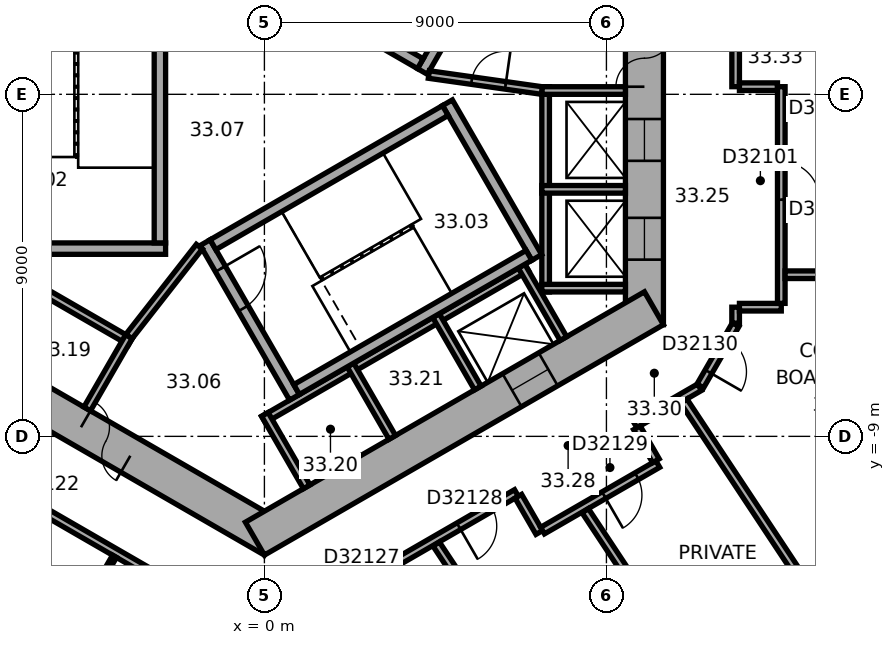
"""IFC4 building model, lengths in metres.
Left out: names, types, materials, properties, quantities, classifications, styles, units other than length and angle.
Written with IfcOpenShell. Run it as: python <this file> out.ifc"""

import sys

from ifc_helpers import new_model, si_unit, direction, frame, frame_2d, origin, place, context, subcontext, project, spatial, rectangle, extrude, element, fill, save


model = new_model("IFC4")
c1 = context("Model", 3, precision=1e-05, world=origin(), true_north=direction((0.0, 1.0)))
c2 = subcontext(c1, "Body", "Model", "MODEL_VIEW")
j1 = project(units=[si_unit("LENGTHUNIT", "METRE"), si_unit("PLANEANGLEUNIT", "RADIAN")], contexts=[c1])
p1 = place(None, origin())
s1 = spatial("IfcSite", under=j1, at=p1, CompositionType="ELEMENT")
p2 = place(p1, origin())
s2 = spatial("IfcBuilding", under=s1, at=p2, CompositionType="ELEMENT")
p3 = place(p2, frame((0.0, 0.0, 135.5)))
s3 = spatial("IfcBuildingStorey", under=s2, at=p3, CompositionType="ELEMENT", Elevation=135.5)
p4 = place(p3, frame((10.0, -6.062, 0.0), z_axis=(0.0, 0.0, 1.0), x_axis=(0.0, 1.0, 0.0)))
e1 = element("IfcWall", 1, at=p4, inside=s3, PredefinedType="SHEAR", context=c2, shape_type="SweptSolid", body=[
    extrude(rectangle(XDim=12.125, YDim=1.0, at=frame_2d((6.062, 0.0))), origin(), (0.0, 0.0, 1.0), 3.7),
])
p5 = place(p4, frame((6.262, 0.0, 0.0)))
e2 = element("IfcOpeningElement", 2, at=p5, cuts=e1, PredefinedType="OPENING", context=c2, shape_type="SweptSolid", body=[
    extrude(rectangle(XDim=1.5, YDim=2.1, at=frame_2d((0.75, 1.05))), frame((0.0, 0.51, 0.0), z_axis=(0.0, -1.0, 0.0), x_axis=(1.0, 0.0, 0.0)), (0.0, 0.0, 1.0), 1.02),
])
p6 = place(p4, frame((1.712, 0.0, 0.0)))
e3 = element("IfcOpeningElement", 3, at=p6, cuts=e1, PredefinedType="OPENING", context=c2, shape_type="SweptSolid", body=[
    extrude(rectangle(XDim=1.1, YDim=2.1, at=frame_2d((0.55, 1.05))), frame((0.0, 0.51, 0.0), z_axis=(0.0, -1.0, 0.0), x_axis=(1.0, 0.0, 0.0)), (0.0, 0.0, 1.0), 1.02),
])
p7 = place(p4, frame((4.312, 0.0, 0.0)))
e4 = element("IfcOpeningElement", 4, at=p7, cuts=e1, PredefinedType="OPENING", context=c2, shape_type="SweptSolid", body=[
    extrude(rectangle(XDim=1.1, YDim=2.1, at=frame_2d((0.55, 1.05))), frame((0.0, 0.51, 0.0), z_axis=(0.0, -1.0, 0.0), x_axis=(1.0, 0.0, 0.0)), (0.0, 0.0, 1.0), 1.02),
])
p8 = place(p3, frame((-10.25, -5.629, 0.0), z_axis=(0.0, 0.0, 1.0), x_axis=(0.866022616891, -0.50000482701, 0.0)))
e5 = element("IfcWall", 5, at=p8, inside=s3, PredefinedType="SHEAR", context=c2, shape_type="SweptSolid", body=[
    extrude(rectangle(XDim=12.125, YDim=1.0, at=frame_2d((6.062, 0.0))), origin(), (0.0, 0.0, 1.0), 3.7),
])
p9 = place(p8, frame((6.262, 0.0, 0.0)))
e6 = element("IfcOpeningElement", 6, at=p9, cuts=e5, PredefinedType="OPENING", context=c2, shape_type="SweptSolid", body=[
    extrude(rectangle(XDim=1.5, YDim=2.1, at=frame_2d((0.75, 1.05))), frame((0.0, 0.51, 0.0), z_axis=(0.0, -1.0, 0.0), x_axis=(1.0, 0.0, 0.0)), (0.0, 0.0, 1.0), 1.02),
])
p10 = place(p3, frame((-0.25, -11.691, 0.0), z_axis=(0.0, 0.0, 1.0), x_axis=(0.866022616891, 0.50000482701, 0.0)))
e7 = element("IfcWall", 7, at=p10, inside=s3, PredefinedType="SHEAR", context=c2, shape_type="SweptSolid", body=[
    extrude(rectangle(XDim=12.125, YDim=1.0, at=frame_2d((6.062, 0.0))), origin(), (0.0, 0.0, 1.0), 3.7),
])
p11 = place(p10, frame((7.812, 0.0, 0.0)))
e8 = element("IfcOpeningElement", 8, at=p11, cuts=e7, PredefinedType="OPENING", context=c2, shape_type="SweptSolid", body=[
    extrude(rectangle(XDim=1.1, YDim=2.1, at=frame_2d((0.55, 1.05))), frame((0.0, 0.51, 0.0), z_axis=(0.0, -1.0, 0.0), x_axis=(1.0, 0.0, 0.0)), (0.0, 0.0, 1.0), 1.02),
])
p12 = place(p3, frame((7.4, -5.2, 0.0), z_axis=(0.0, 0.0, 1.0), x_axis=(0.0, 1.0, 0.0)))
e9 = element("IfcWall", 9, at=p12, inside=s3, PredefinedType="PARTITIONING", context=c2, shape_type="SweptSolid", body=[
    extrude(rectangle(XDim=5.4, YDim=0.2, at=frame_2d((2.7, 0.0))), origin(), (0.0, 0.0, 1.0), 3.35),
])
for number, where, z_axis, x_axis in (
    (10, (7.3, -5.1, 0.0), (0.0, 0.0, 1.0), (1.0, 0.0, 0.0)),
    (11, (7.3, -2.5, 0.0), (0.0, 0.0, 1.0), (1.0, 0.0, 0.0)),
    (12, (7.3, 0.1, 0.0), (0.0, 0.0, 1.0), (1.0, 0.0, 0.0)),
):
    element("IfcWall", number, at=place(p3, frame(where, z_axis=z_axis, x_axis=x_axis)), inside=s3, PredefinedType="PARTITIONING", context=c2, shape_type="SweptSolid", body=[
        extrude(rectangle(XDim=2.2, YDim=0.2, at=frame_2d((1.1, 0.0))), origin(), (0.0, 0.0, 1.0), 3.35),
    ])
p13 = place(p3, frame((-8.203, -3.809, 0.0), z_axis=(0.0, 0.0, 1.0), x_axis=(0.866028230842, -0.499995103361, 0.0)))
e13 = element("IfcWall", 13, at=p13, inside=s3, PredefinedType="PARTITIONING", context=c2, shape_type="SweptSolid", body=[
    extrude(rectangle(XDim=5.4, YDim=0.2, at=frame_2d((2.7, 0.0))), origin(), (0.0, 0.0, 1.0), 3.35),
])
p14 = place(p3, frame((-3.563, -6.372, 0.0), z_axis=(0.0, 0.0, 1.0), x_axis=(-0.499994660107, -0.866028486751, 0.0)))
e14 = element("IfcWall", 14, at=p14, inside=s3, PredefinedType="PARTITIONING", context=c2, shape_type="SweptSolid", body=[
    extrude(rectangle(XDim=2.2, YDim=0.2, at=frame_2d((1.1, 0.0))), origin(), (0.0, 0.0, 1.0), 3.35),
])
p15 = place(p3, frame((-0.024, -8.559, 0.0), z_axis=(0.0, 0.0, 1.0), x_axis=(0.866026010844, 0.49999894854, 0.0)))
e15 = element("IfcWall", 15, at=p15, inside=s3, PredefinedType="PARTITIONING", context=c2, shape_type="SweptSolid", body=[
    extrude(rectangle(XDim=8.0, YDim=0.2, at=frame_2d((4.0, 0.0))), origin(), (0.0, 0.0, 1.0), 3.35),
])
for number, where, z_axis, x_axis in (
    (16, (0.013, -8.422, 0.0), (0.0, 0.0, 1.0), (0.5, -0.866, 0.0)),
    (17, (2.264, -7.122, 0.0), (0.0, 0.0, 1.0), (0.5, -0.866, 0.0)),
    (18, (4.516, -5.822, 0.0), (0.0, 0.0, 1.0), (0.5, -0.866, 0.0)),
    (19, (6.768, -4.522, 0.0), (0.0, 0.0, 1.0), (0.5, -0.866, 0.0)),
):
    element("IfcWall", number, at=place(p3, frame(where, z_axis=z_axis, x_axis=x_axis)), inside=s3, PredefinedType="PARTITIONING", context=c2, shape_type="SweptSolid", body=[
        extrude(rectangle(XDim=2.2, YDim=0.2, at=frame_2d((1.1, 0.0))), origin(), (0.0, 0.0, 1.0), 3.35),
    ])
p16 = place(p3, frame((4.158, 0.602, 0.0), z_axis=(0.0, 0.0, 1.0), x_axis=(0.499977259774, 0.866038532462, 0.0)))
e20 = element("IfcWall", 20, at=p16, inside=s3, PredefinedType="SHEAR", context=c2, shape_type="SweptSolid", body=[
    extrude(rectangle(XDim=4.7, YDim=0.3, at=frame_2d((2.35, 0.0))), origin(), (0.0, 0.0, 1.0), 3.35),
])
p17 = place(p16, frame((0.8, 0.0, 0.0)))
e21 = element("IfcOpeningElement", 21, at=p17, cuts=e20, PredefinedType="OPENING", context=c2, shape_type="SweptSolid", body=[
    extrude(rectangle(XDim=1.2, YDim=2.1, at=frame_2d((0.6, 1.05))), frame((0.0, 0.16, 0.0), z_axis=(0.0, -1.0, 0.0), x_axis=(1.0, 0.0, 0.0)), (0.0, 0.0, 1.0), 0.32),
])
p18 = place(p3, frame((4.103, 0.807, 0.0), z_axis=(0.0, 0.0, 1.0), x_axis=(-0.866027801685, 0.499995846692, 0.0)))
e22 = element("IfcWall", 22, at=p18, inside=s3, PredefinedType="SHEAR", context=c2, shape_type="SweptSolid", body=[
    extrude(rectangle(XDim=7.06, YDim=0.3, at=frame_2d((3.53, 0.0))), origin(), (0.0, 0.0, 1.0), 3.35),
])
p19 = place(p3, frame((-2.6, -4.06, 0.0), z_axis=(0.0, 0.0, 1.0), x_axis=(-1.0, 0.0, 0.0)))
e23 = element("IfcWall", 23, at=p19, inside=s3, PredefinedType="SHEAR", context=c2, shape_type="SweptSolid", body=[
    extrude(rectangle(XDim=4.7, YDim=0.3, at=frame_2d((2.35, 0.0))), origin(), (0.0, 0.0, 1.0), 3.35),
])
p20 = place(p3, frame((-2.75, 3.15, 0.0), z_axis=(0.0, 0.0, 1.0), x_axis=(0.0, -1.0, 0.0)))
e24 = element("IfcWall", 24, at=p20, inside=s3, PredefinedType="SHEAR", context=c2, shape_type="SweptSolid", body=[
    extrude(rectangle(XDim=7.06, YDim=0.3, at=frame_2d((3.53, 0.0))), origin(), (0.0, 0.0, 1.0), 3.35),
])
p21 = place(p3, frame((-1.558, -3.902, 0.0), z_axis=(0.0, 0.0, 1.0), x_axis=(0.499977259774, -0.866038532462, 0.0)))
e25 = element("IfcWall", 25, at=p21, inside=s3, PredefinedType="SHEAR", context=c2, shape_type="SweptSolid", body=[
    extrude(rectangle(XDim=4.7, YDim=0.3, at=frame_2d((2.35, 0.0))), origin(), (0.0, 0.0, 1.0), 3.35),
])
p22 = place(p21, frame((0.8, 0.0, 0.0)))
e26 = element("IfcOpeningElement", 26, at=p22, cuts=e25, PredefinedType="OPENING", context=c2, shape_type="SweptSolid", body=[
    extrude(rectangle(XDim=1.2, YDim=2.1, at=frame_2d((0.6, 1.05))), frame((0.0, 0.16, 0.0), z_axis=(0.0, -1.0, 0.0), x_axis=(1.0, 0.0, 0.0)), (0.0, 0.0, 1.0), 0.32),
])
p23 = place(p3, frame((4.816, -0.222, 0.0), z_axis=(0.0, 0.0, 1.0), x_axis=(0.499977259774, -0.866038532462, 0.0)))
e27 = element("IfcWall", 27, at=p23, inside=s3, PredefinedType="SHEAR", context=c2, shape_type="SweptSolid", body=[
    extrude(rectangle(XDim=4.7, YDim=0.3, at=frame_2d((2.35, 0.0))), origin(), (0.0, 0.0, 1.0), 3.35),
])
for number, where, z_axis, x_axis in (
    (28, (-1.353, -3.957, 0.0), (0.0, 0.0, 1.0), (0.866, 0.5, 0.0)),
    (29, (0.847, -7.767, 0.0), (0.0, 0.0, 1.0), (0.866, 0.5, 0.0)),
):
    element("IfcWall", number, at=place(p3, frame(where, z_axis=z_axis, x_axis=x_axis)), inside=s3, PredefinedType="SHEAR", context=c2, shape_type="SweptSolid", body=[
        extrude(rectangle(XDim=7.06, YDim=0.3, at=frame_2d((3.53, 0.0))), origin(), (0.0, 0.0, 1.0), 3.35),
    ])
p24 = place(p3, frame((4.327, 0.521, 0.0), z_axis=(0.0, 0.0, 1.0), x_axis=(0.990124376366, -0.14019172346, 0.0)))
e30 = element("IfcWall", 30, at=p24, inside=s3, PredefinedType="PARTITIONING", context=c2, shape_type="SweptSolid", body=[
    extrude(rectangle(XDim=3.002, YDim=0.2, at=frame_2d((1.501, 0.0))), origin(), (0.0, 0.0, 1.0), 3.35),
])
p25 = place(p24, frame((1.138, 0.0, 0.0)))
e31 = element("IfcOpeningElement", 31, at=p25, cuts=e30, PredefinedType="OPENING", context=c2, shape_type="SweptSolid", body=[
    extrude(rectangle(XDim=0.9, YDim=2.1, at=frame_2d((0.45, 1.05))), frame((0.0, 0.11, 0.0), z_axis=(0.0, -1.0, 0.0), x_axis=(1.0, 0.0, 0.0)), (0.0, 0.0, 1.0), 0.22),
])
p26 = place(p3, frame((-1.712, -4.008, 0.0), z_axis=(0.0, 0.0, 1.0), x_axis=(-0.616549420702, -0.787316208287, 0.0)))
e32 = element("IfcWall", 32, at=p26, inside=s3, PredefinedType="PARTITIONING", context=c2, shape_type="SweptSolid", body=[
    extrude(rectangle(XDim=3.002, YDim=0.2, at=frame_2d((1.501, 0.0))), origin(), (0.0, 0.0, 1.0), 3.35),
])
p27 = place(p3, frame((-11.415, -7.728, 0.0), z_axis=(0.0, 0.0, 1.0), x_axis=(0.866022749921, -0.500004596598, 0.0)))
e33 = element("IfcWall", 33, at=p27, inside=s3, PredefinedType="PARTITIONING", context=c2, shape_type="SweptSolid", body=[
    extrude(rectangle(XDim=12.084, YDim=0.2, at=frame_2d((6.042, 0.0))), origin(), (0.0, 0.0, 1.0), 3.35),
])
p28 = place(p27, frame((5.58, 0.0, 0.0)))
e34 = element("IfcOpeningElement", 34, at=p28, cuts=e33, PredefinedType="OPENING", context=c2, shape_type="SweptSolid", body=[
    extrude(rectangle(XDim=1.0, YDim=2.1, at=frame_2d((0.5, 1.05))), frame((0.0, 0.11, 0.0), z_axis=(0.0, -1.0, 0.0), x_axis=(1.0, 0.0, 0.0)), (0.0, 0.0, 1.0), 0.22),
])
p29 = place(p3, frame((-5.695, -15.188, 0.0), z_axis=(0.0, 0.0, 1.0), x_axis=(0.500010275428, 0.866019471182, 0.0)))
e35 = element("IfcWall", 35, at=p29, inside=s3, PredefinedType="PARTITIONING", context=c2, shape_type="SweptSolid", body=[
    extrude(rectangle(XDim=3.5, YDim=0.12, at=frame_2d((1.75, 0.0))), origin(), (0.0, 0.0, 1.0), 3.35),
])
p30 = place(p29, frame((1.3, 0.0, 0.0)))
e36 = element("IfcOpeningElement", 36, at=p30, cuts=e35, PredefinedType="OPENING", context=c2, shape_type="SweptSolid", body=[
    extrude(rectangle(XDim=0.9, YDim=2.1, at=frame_2d((0.45, 1.05))), frame((0.0, 0.07, 0.0), z_axis=(0.0, -1.0, 0.0), x_axis=(1.0, 0.0, 0.0)), (0.0, 0.0, 1.0), 0.14),
])
p31 = place(p3, frame((1.204, -13.623, 0.0), z_axis=(0.0, 0.0, 1.0), x_axis=(0.866031867142, 0.49998880497, 0.0)))
e37 = element("IfcWall", 37, at=p31, inside=s3, PredefinedType="PARTITIONING", context=c2, shape_type="SweptSolid", body=[
    extrude(rectangle(XDim=6.268, YDim=0.2, at=frame_2d((3.134, 0.0))), origin(), (0.0, 0.0, 1.0), 3.35),
])
p32 = place(p31, frame((1.381, 0.0, 0.0)))
e38 = element("IfcOpeningElement", 38, at=p32, cuts=e37, PredefinedType="OPENING", context=c2, shape_type="SweptSolid", body=[
    extrude(rectangle(XDim=1.0, YDim=2.1, at=frame_2d((0.5, 1.05))), frame((0.0, 0.11, 0.0), z_axis=(0.0, -1.0, 0.0), x_axis=(1.0, 0.0, 0.0)), (0.0, 0.0, 1.0), 0.22),
])
p33 = place(p31, frame((4.515, 0.0, 0.0)))
e39 = element("IfcOpeningElement", 39, at=p33, cuts=e37, PredefinedType="OPENING", context=c2, shape_type="SweptSolid", body=[
    extrude(rectangle(XDim=1.0, YDim=2.1, at=frame_2d((0.5, 1.05))), frame((0.0, 0.11, 0.0), z_axis=(0.0, -1.0, 0.0), x_axis=(1.0, 0.0, 0.0)), (0.0, 0.0, 1.0), 0.22),
])
p34 = place(p3, frame((6.682, -10.576, 0.0), z_axis=(0.0, 0.0, 1.0), x_axis=(0.499978356969, -0.866037899034, 0.0)))
e40 = element("IfcWall", 40, at=p34, inside=s3, PredefinedType="PARTITIONING", context=c2, shape_type="SweptSolid", body=[
    extrude(rectangle(XDim=1.101, YDim=0.2, at=frame_2d((0.551, 0.0))), origin(), (0.0, 0.0, 1.0), 3.35),
])
p35 = place(p3, frame((7.319, -11.479, 0.0), z_axis=(0.0, 0.0, 1.0), x_axis=(0.866038154057, 0.49997791523, 0.0)))
e41 = element("IfcWall", 41, at=p35, inside=s3, PredefinedType="PARTITIONING", context=c2, shape_type="SweptSolid", body=[
    extrude(rectangle(XDim=3.502, YDim=0.2, at=frame_2d((1.751, 0.0))), origin(), (0.0, 0.0, 1.0), 3.35),
])
p36 = place(p35, frame((1.865, 0.0, 0.0)))
e42 = element("IfcOpeningElement", 42, at=p36, cuts=e41, PredefinedType="OPENING", context=c2, shape_type="SweptSolid", body=[
    extrude(rectangle(XDim=1.0, YDim=2.1, at=frame_2d((0.5, 1.05))), frame((0.0, 0.11, 0.0), z_axis=(0.0, -1.0, 0.0), x_axis=(1.0, 0.0, 0.0)), (0.0, 0.0, 1.0), 0.22),
])
p37 = place(p3, frame((9.15, -18.827, 0.0), z_axis=(0.0, 0.0, 1.0), x_axis=(-0.551942527453, 0.833882153777, 0.0)))
e43 = element("IfcWall", 43, at=p37, inside=s3, PredefinedType="PARTITIONING", context=c2, shape_type="SweptSolid", body=[
    extrude(rectangle(XDim=8.386, YDim=0.2, at=frame_2d((4.193, 0.0))), origin(), (0.0, 0.0, 1.0), 2.55),
])
p38 = place(p3, frame((9.752, -8.688, 0.0), z_axis=(0.0, 0.0, 1.0), x_axis=(0.865974105138, 0.500088841337, 0.0)))
e44 = element("IfcWall", 44, at=p38, inside=s3, PredefinedType="PARTITIONING", context=c2, shape_type="SweptSolid", body=[
    extrude(rectangle(XDim=1.961, YDim=0.2, at=frame_2d((0.98, 0.0))), origin(), (0.0, 0.0, 1.0), 3.35),
])
p39 = place(p3, frame((10.302, -9.642, 0.0), z_axis=(0.0, 0.0, 1.0), x_axis=(-0.500074377092, 0.865982457891, 0.0)))
e45 = element("IfcWall", 45, at=p39, inside=s3, PredefinedType="PARTITIONING", context=c2, shape_type="SweptSolid", body=[
    extrude(rectangle(XDim=1.001, YDim=0.2, at=frame_2d((0.5, 0.0))), origin(), (0.0, 0.0, 1.0), 3.35),
])
p40 = place(p3, frame((11.47, -7.673, 0.0), z_axis=(0.0, 0.0, 1.0), x_axis=(0.499964847546, 0.866045698112, 0.0)))
e46 = element("IfcWall", 46, at=p40, inside=s3, PredefinedType="PARTITIONING", context=c2, shape_type="SweptSolid", body=[
    extrude(rectangle(XDim=1.86, YDim=0.2, at=frame_2d((0.93, 0.0))), origin(), (0.0, 0.0, 1.0), 3.35),
])
p41 = place(p40, frame((0.43, 0.0, 0.0)))
e47 = element("IfcOpeningElement", 47, at=p41, cuts=e46, PredefinedType="OPENING", context=c2, shape_type="SweptSolid", body=[
    extrude(rectangle(XDim=1.0, YDim=2.1, at=frame_2d((0.5, 1.05))), frame((0.0, 0.11, 0.0), z_axis=(0.0, -1.0, 0.0), x_axis=(1.0, 0.0, 0.0)), (0.0, 0.0, 1.0), 0.22),
])
p42 = place(p3, frame((12.281, -16.755, 0.0), z_axis=(0.0, 0.0, 1.0), x_axis=(-0.551925794663, 0.833893228888, 0.0)))
e48 = element("IfcWall", 48, at=p42, inside=s3, PredefinedType="PARTITIONING", context=c2, shape_type="SweptSolid", body=[
    extrude(rectangle(XDim=6.953, YDim=0.2, at=frame_2d((3.476, 0.0))), origin(), (0.0, 0.0, 1.0), 3.35),
])
p43 = place(p3, frame((12.4, -6.022, 0.0), z_axis=(0.0, 0.0, 1.0), x_axis=(0.0, 1.0, 0.0)))
e49 = element("IfcWall", 49, at=p43, inside=s3, PredefinedType="PARTITIONING", context=c2, shape_type="SweptSolid", body=[
    extrude(rectangle(XDim=0.421, YDim=0.2, at=frame_2d((0.21, 0.0))), origin(), (0.0, 0.0, 1.0), 3.35),
])
p44 = place(p3, frame((12.4, 0.201, 0.0), z_axis=(0.0, 0.0, 1.0), x_axis=(0.0, 1.0, 0.0)))
e50 = element("IfcWall", 50, at=p44, inside=s3, PredefinedType="PARTITIONING", context=c2, shape_type="SweptSolid", body=[
    extrude(rectangle(XDim=5.861, YDim=0.2, at=frame_2d((2.931, 0.0))), origin(), (0.0, 0.0, 1.0), 3.35),
])
p45 = place(p44, frame((3.711, 0.0, 0.0)))
e51 = element("IfcOpeningElement", 51, at=p45, cuts=e50, PredefinedType="OPENING", context=c2, shape_type="SweptSolid", body=[
    extrude(rectangle(XDim=1.0, YDim=2.1, at=frame_2d((0.5, 1.05))), frame((0.0, 0.11, 0.0), z_axis=(0.0, -1.0, 0.0), x_axis=(1.0, 0.0, 0.0)), (0.0, 0.0, 1.0), 0.22),
])
p46 = place(p3, frame((12.5, -5.601, 0.0), z_axis=(0.0, 0.0, 1.0), x_axis=(1.0, 0.0, 0.0)))
e52 = element("IfcWall", 52, at=p46, inside=s3, PredefinedType="PARTITIONING", context=c2, shape_type="SweptSolid", body=[
    extrude(rectangle(XDim=1.101, YDim=0.2, at=frame_2d((0.551, 0.0))), origin(), (0.0, 0.0, 1.0), 3.35),
])
p47 = place(p3, frame((13.501, 0.201, 0.0), z_axis=(0.0, 0.0, 1.0), x_axis=(-1.0, 0.0, 0.0)))
e53 = element("IfcWall", 53, at=p47, inside=s3, PredefinedType="PARTITIONING", context=c2, shape_type="SweptSolid", body=[
    extrude(rectangle(XDim=1.001, YDim=0.2, at=frame_2d((0.5, 0.0))), origin(), (0.0, 0.0, 1.0), 3.35),
])
p48 = place(p3, frame((13.601, -5.501, 0.0), z_axis=(0.0, 0.0, 1.0), x_axis=(0.0, 1.0, 0.0)))
e54 = element("IfcWall", 54, at=p48, inside=s3, PredefinedType="PARTITIONING", context=c2, shape_type="SweptSolid", body=[
    extrude(rectangle(XDim=5.702, YDim=0.2, at=frame_2d((2.851, 0.0))), origin(), (0.0, 0.0, 1.0), 3.35),
])
p49 = place(p48, frame((2.728, 0.0, 0.0)))
e55 = element("IfcOpeningElement", 55, at=p49, cuts=e54, PredefinedType="OPENING", context=c2, shape_type="SweptSolid", body=[
    extrude(rectangle(XDim=1.0, YDim=2.1, at=frame_2d((0.5, 1.05))), frame((0.0, 0.11, 0.0), z_axis=(0.0, -1.0, 0.0), x_axis=(1.0, 0.0, 0.0)), (0.0, 0.0, 1.0), 0.22),
])
p50 = place(p3, frame((13.701, -4.747, 0.0), z_axis=(0.0, 0.0, 1.0), x_axis=(1.0, 0.0, 0.0)))
e56 = element("IfcWall", 56, at=p50, inside=s3, PredefinedType="PARTITIONING", context=c2, shape_type="SweptSolid", body=[
    extrude(rectangle(XDim=7.049, YDim=0.2, at=frame_2d((3.524, 0.0))), origin(), (0.0, 0.0, 1.0), 3.35),
])
p51 = place(p3, frame((15.411, -14.683, 0.0), z_axis=(0.0, 0.0, 1.0), x_axis=(-0.551932106251, 0.833889051427, 0.0)))
e57 = element("IfcWall", 57, at=p51, inside=s3, PredefinedType="PARTITIONING", context=c2, shape_type="SweptSolid", body=[
    extrude(rectangle(XDim=7.926, YDim=0.2, at=frame_2d((3.963, 0.0))), origin(), (0.0, 0.0, 1.0), 2.55),
])
p52 = place(p5, origin())
e58 = element("IfcDoor", 58, at=p52, inside=s3, OperationType="DOUBLE_DOOR_SINGLE_SWING", PredefinedType="DOOR", context=c2, shape_type="SweptSolid", body=[
    extrude(rectangle(XDim=1.5, YDim=2.1, at=frame_2d((0.75, 1.05))), frame((0.0, 0.025, 0.0), z_axis=(0.0, -1.0, 0.0), x_axis=(1.0, 0.0, 0.0)), (0.0, 0.0, 1.0), 0.05),
])
fill(e2, e58)
p53 = place(p9, origin())
e59 = element("IfcDoor", 59, at=p53, inside=s3, OperationType="DOUBLE_DOOR_SINGLE_SWING", PredefinedType="DOOR", context=c2, shape_type="SweptSolid", body=[
    extrude(rectangle(XDim=1.5, YDim=2.1, at=frame_2d((0.75, 1.05))), frame((0.0, 0.025, 0.0), z_axis=(0.0, -1.0, 0.0), x_axis=(1.0, 0.0, 0.0)), (0.0, 0.0, 1.0), 0.05),
])
fill(e6, e59)
p54 = place(p22, origin())
e60 = element("IfcDoor", 60, at=p54, inside=s3, OperationType="SINGLE_SWING_RIGHT", PredefinedType="DOOR", context=c2, shape_type="SweptSolid", body=[
    extrude(rectangle(XDim=1.2, YDim=2.1, at=frame_2d((0.6, 1.05))), frame((0.0, 0.025, 0.0), z_axis=(0.0, -1.0, 0.0), x_axis=(1.0, 0.0, 0.0)), (0.0, 0.0, 1.0), 0.05),
])
fill(e26, e60)
p55 = place(p25, origin())
e61 = element("IfcDoor", 61, at=p55, inside=s3, OperationType="SINGLE_SWING_LEFT", PredefinedType="DOOR", context=c2, shape_type="SweptSolid", body=[
    extrude(rectangle(XDim=0.9, YDim=2.1, at=frame_2d((0.45, 1.05))), frame((0.0, 0.025, 0.0), z_axis=(0.0, -1.0, 0.0), x_axis=(1.0, 0.0, 0.0)), (0.0, 0.0, 1.0), 0.05),
])
fill(e31, e61)
p56 = place(p6, origin())
e62 = element("IfcDoor", 62, at=p56, inside=s3, OperationType="DOUBLE_DOOR_SLIDING", PredefinedType="DOOR", context=c2, shape_type="SweptSolid", body=[
    extrude(rectangle(XDim=1.1, YDim=2.1, at=frame_2d((0.55, 1.05))), frame((0.0, 0.025, 0.0), z_axis=(0.0, -1.0, 0.0), x_axis=(1.0, 0.0, 0.0)), (0.0, 0.0, 1.0), 0.05),
])
fill(e3, e62)
p57 = place(p7, origin())
e63 = element("IfcDoor", 63, at=p57, inside=s3, OperationType="DOUBLE_DOOR_SLIDING", PredefinedType="DOOR", context=c2, shape_type="SweptSolid", body=[
    extrude(rectangle(XDim=1.1, YDim=2.1, at=frame_2d((0.55, 1.05))), frame((0.0, 0.025, 0.0), z_axis=(0.0, -1.0, 0.0), x_axis=(1.0, 0.0, 0.0)), (0.0, 0.0, 1.0), 0.05),
])
fill(e4, e63)
p58 = place(p11, origin())
e64 = element("IfcDoor", 64, at=p58, inside=s3, OperationType="DOUBLE_DOOR_SLIDING", PredefinedType="DOOR", context=c2, shape_type="SweptSolid", body=[
    extrude(rectangle(XDim=1.1, YDim=2.1, at=frame_2d((0.55, 1.05))), frame((0.0, 0.025, 0.0), z_axis=(0.0, -1.0, 0.0), x_axis=(1.0, 0.0, 0.0)), (0.0, 0.0, 1.0), 0.05),
])
fill(e8, e64)
p59 = place(p49, origin())
e65 = element("IfcDoor", 65, at=p59, inside=s3, OperationType="SINGLE_SWING_LEFT", PredefinedType="DOOR", context=c2, shape_type="SweptSolid", body=[
    extrude(rectangle(XDim=1.0, YDim=2.1, at=frame_2d((0.5, 1.05))), frame((0.0, 0.025, 0.0), z_axis=(0.0, -1.0, 0.0), x_axis=(1.0, 0.0, 0.0)), (0.0, 0.0, 1.0), 0.05),
])
fill(e55, e65)
p60 = place(p33, origin())
e66 = element("IfcDoor", 66, at=p60, inside=s3, OperationType="SINGLE_SWING_LEFT", PredefinedType="DOOR", context=c2, shape_type="SweptSolid", body=[
    extrude(rectangle(XDim=1.0, YDim=2.1, at=frame_2d((0.5, 1.05))), frame((0.0, 0.025, 0.0), z_axis=(0.0, -1.0, 0.0), x_axis=(1.0, 0.0, 0.0)), (0.0, 0.0, 1.0), 0.05),
])
fill(e39, e66)
p61 = place(p36, origin())
e67 = element("IfcDoor", 67, at=p61, inside=s3, OperationType="SINGLE_SWING_LEFT", PredefinedType="DOOR", context=c2, shape_type="SweptSolid", body=[
    extrude(rectangle(XDim=1.0, YDim=2.1, at=frame_2d((0.5, 1.05))), frame((0.0, 0.025, 0.0), z_axis=(0.0, -1.0, 0.0), x_axis=(1.0, 0.0, 0.0)), (0.0, 0.0, 1.0), 0.05),
])
fill(e42, e67)
p62 = place(p41, origin())
e68 = element("IfcDoor", 68, at=p62, inside=s3, OperationType="SINGLE_SWING_LEFT", PredefinedType="DOOR", context=c2, shape_type="SweptSolid", body=[
    extrude(rectangle(XDim=1.0, YDim=2.1, at=frame_2d((0.5, 1.05))), frame((0.0, 0.025, 0.0), z_axis=(0.0, -1.0, 0.0), x_axis=(1.0, 0.0, 0.0)), (0.0, 0.0, 1.0), 0.05),
])
fill(e47, e68)
save(model, sys.argv[1])
